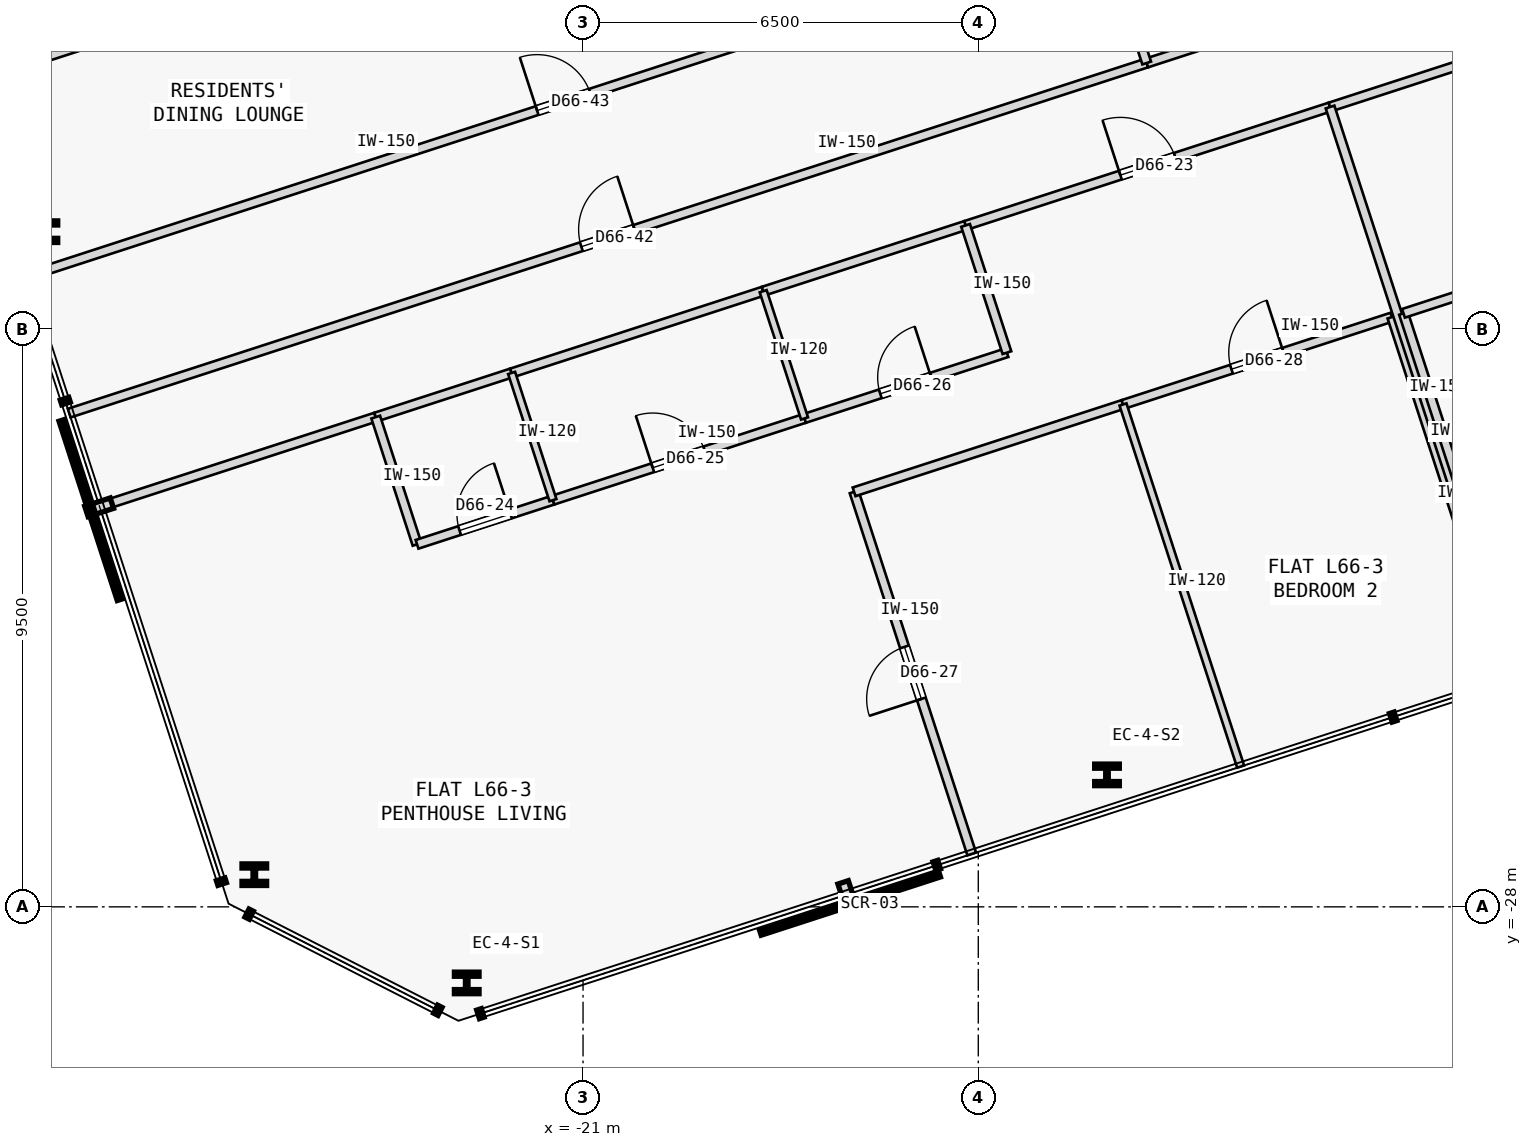
"""IFC4 building model, lengths in metres.
Left out: names, types, materials, properties, quantities, classifications, styles, units other than length and angle.
Written with IfcOpenShell. Run it as: python <this file> out.ifc"""

import sys

from ifc_helpers import new_model, si_unit, direction, frame, frame_2d, origin, origin_2d, place, context, subcontext, project, spatial, rectangle, i_section, extrude, element, fill, save


model = new_model("IFC4")
c1 = context("Model", 3, precision=1e-05, world=origin(), true_north=direction((0.0, 1.0)))
c2 = subcontext(c1, "Body", "Model", "MODEL_VIEW")
j1 = project(units=[si_unit("LENGTHUNIT", "METRE"), si_unit("PLANEANGLEUNIT", "RADIAN")], contexts=[c1])
p1 = place(None, origin())
s1 = spatial("IfcSite", under=j1, at=p1, CompositionType="ELEMENT")
p2 = place(p1, origin())
s2 = spatial("IfcBuilding", under=s1, at=p2, CompositionType="ELEMENT")
p3 = place(p2, frame((0.0, 0.0, 247.75)))
s3 = spatial("IfcBuildingStorey", under=s2, at=p3, CompositionType="ELEMENT", Elevation=247.75)
for number, where, z_axis, x_axis in (
    (1, (-22.913, -29.251, 0.0), (0.0, 0.0, 1.0), (1.0, 0.0, 0.0)),
    (2, (-12.384, -25.83, 0.0), (0.0, 0.0, 1.0), (1.0, 0.0, 0.0)),
    (3, (-29.842, -16.897, 0.0), (0.0, 0.0, 1.0), (1.0, 0.0, 0.0)),
    (4, (-26.406, -27.471, 0.0), (0.0, 0.0, 1.0), (1.0, 0.0, 0.0)),
):
    element("IfcColumn", number, at=place(p3, frame(where, z_axis=z_axis, x_axis=x_axis)), inside=s3, PredefinedType="COLUMN", context=c2, shape_type="SweptSolid", body=[
        extrude(i_section(OverallWidth=0.405, OverallDepth=0.355, WebThickness=0.042, FlangeThickness=0.068, FilletRadius=0.015, at=origin_2d()), origin(), (0.0, 0.0, 1.0), 3.35),
    ])
p4 = place(p3, frame((-28.95, -21.421, 0.0), z_axis=(0.0, 0.0, 1.0), x_axis=(0.951049476022, 0.309038661268, 0.0)))
e5 = element("IfcWall", 5, at=p4, inside=s3, PredefinedType="PARTITIONING", context=c2, shape_type="SweptSolid", body=[
    extrude(rectangle(XDim=4.774, YDim=0.15, at=frame_2d((2.387, 0.0))), origin(), (0.0, 0.0, 1.0), 3.125),
])
p5 = place(p3, frame((-14.709, -16.794, 0.0), z_axis=(0.0, 0.0, 1.0), x_axis=(0.951050295235, 0.309036140172, 0.0)))
e6 = element("IfcWall", 6, at=p5, inside=s3, PredefinedType="PARTITIONING", context=c2, shape_type="SweptSolid", body=[
    extrude(rectangle(XDim=6.302, YDim=0.15, at=frame_2d((3.151, 0.0))), origin(), (0.0, 0.0, 1.0), 3.125),
])
p6 = place(p5, frame((2.676, 0.0, 0.0)))
e7 = element("IfcOpeningElement", 7, at=p6, cuts=e6, PredefinedType="OPENING", context=c2, shape_type="SweptSolid", body=[
    extrude(rectangle(XDim=0.95, YDim=2.15, at=frame_2d((0.475, 1.075))), frame((0.0, 0.085, 0.0), z_axis=(0.0, -1.0, 0.0), x_axis=(1.0, 0.0, 0.0)), (0.0, 0.0, 1.0), 0.17),
])
p7 = place(p3, frame((-24.41, -19.946, 0.0), z_axis=(0.0, 0.0, 1.0), x_axis=(0.951076048914, 0.308956872689, 0.0)))
e8 = element("IfcWall", 8, at=p7, inside=s3, PredefinedType="PARTITIONING", context=c2, shape_type="SweptSolid", body=[
    extrude(rectangle(XDim=2.35, YDim=0.15, at=frame_2d((1.175, 0.0))), origin(), (0.0, 0.0, 1.0), 3.125),
])
p8 = place(p3, frame((-22.175, -19.22, 0.0), z_axis=(0.0, 0.0, 1.0), x_axis=(0.951052627573, 0.309028962374, 0.0)))
e9 = element("IfcWall", 9, at=p8, inside=s3, PredefinedType="PARTITIONING", context=c2, shape_type="SweptSolid", body=[
    extrude(rectangle(XDim=4.35, YDim=0.15, at=frame_2d((2.175, 0.0))), origin(), (0.0, 0.0, 1.0), 3.125),
])
p9 = place(p3, frame((-18.038, -17.876, 0.0), z_axis=(0.0, 0.0, 1.0), x_axis=(0.951062257173, 0.308999325213, 0.0)))
e10 = element("IfcWall", 10, at=p9, inside=s3, PredefinedType="PARTITIONING", context=c2, shape_type="SweptSolid", body=[
    extrude(rectangle(XDim=3.5, YDim=0.15, at=frame_2d((1.75, 0.0))), origin(), (0.0, 0.0, 1.0), 3.125),
])
p10 = place(p3, frame((-8.715, -14.847, 0.0), z_axis=(0.0, 0.0, 1.0), x_axis=(0.951061767293, 0.309000832997, 0.0)))
e11 = element("IfcWall", 11, at=p10, inside=s3, PredefinedType="PARTITIONING", context=c2, shape_type="SweptSolid", body=[
    extrude(rectangle(XDim=4.404, YDim=0.15, at=frame_2d((2.202, 0.0))), origin(), (0.0, 0.0, 1.0), 3.125),
])
p11 = place(p3, frame((-29.45, -19.881, 0.0), z_axis=(0.0, 0.0, 1.0), x_axis=(0.95105650271, 0.309017036186, 0.0)))
e12 = element("IfcWall", 12, at=p11, inside=s3, PredefinedType="PARTITIONING", context=c2, shape_type="SweptSolid", body=[
    extrude(rectangle(XDim=18.632, YDim=0.15, at=frame_2d((9.316, 0.0))), origin(), (0.0, 0.0, 1.0), 3.125),
])
p12 = place(p11, frame((8.856, 0.0, 0.0)))
e13 = element("IfcOpeningElement", 13, at=p12, cuts=e12, PredefinedType="OPENING", context=c2, shape_type="SweptSolid", body=[
    extrude(rectangle(XDim=0.92, YDim=2.15, at=frame_2d((0.46, 1.075))), frame((0.0, 0.085, 0.0), z_axis=(0.0, -1.0, 0.0), x_axis=(1.0, 0.0, 0.0)), (0.0, 0.0, 1.0), 0.17),
])
p13 = place(p3, frame((-11.73, -14.123, 0.0), z_axis=(0.0, 0.0, 1.0), x_axis=(0.951052502763, 0.309029346483, 0.0)))
e14 = element("IfcWall", 14, at=p13, inside=s3, PredefinedType="PARTITIONING", context=c2, shape_type="SweptSolid", body=[
    extrude(rectangle(XDim=3.698, YDim=0.15, at=frame_2d((1.849, 0.0))), origin(), (0.0, 0.0, 1.0), 3.125),
])
p14 = place(p13, frame((1.389, 0.0, 0.0)))
e15 = element("IfcOpeningElement", 15, at=p14, cuts=e14, PredefinedType="OPENING", context=c2, shape_type="SweptSolid", body=[
    extrude(rectangle(XDim=0.92, YDim=2.15, at=frame_2d((0.46, 1.075))), frame((0.0, 0.085, 0.0), z_axis=(0.0, -1.0, 0.0), x_axis=(1.0, 0.0, 0.0)), (0.0, 0.0, 1.0), 0.17),
])
p15 = place(p3, frame((-23.73, -22.038, 0.0), z_axis=(0.0, 0.0, 1.0), x_axis=(-0.309060979314, 0.951042223598, 0.0)))
e16 = element("IfcWall", 16, at=p15, inside=s3, PredefinedType="PARTITIONING", context=c2, shape_type="SweptSolid", body=[
    extrude(rectangle(XDim=2.2, YDim=0.15, at=frame_2d((1.1, 0.0))), origin(), (0.0, 0.0, 1.0), 3.125),
])
p16 = place(p3, frame((-23.73, -22.038, 0.0), z_axis=(0.0, 0.0, 1.0), x_axis=(0.951066131077, 0.308987401554, 0.0)))
e17 = element("IfcWall", 17, at=p16, inside=s3, PredefinedType="PARTITIONING", context=c2, shape_type="SweptSolid", body=[
    extrude(rectangle(XDim=2.35, YDim=0.15, at=frame_2d((1.175, 0.0))), origin(), (0.0, 0.0, 1.0), 3.125),
])
p17 = place(p16, frame((0.735, 0.0, 0.0)))
e18 = element("IfcOpeningElement", 18, at=p17, cuts=e17, PredefinedType="OPENING", context=c2, shape_type="SweptSolid", body=[
    extrude(rectangle(XDim=0.88, YDim=2.15, at=frame_2d((0.44, 1.075))), frame((0.0, 0.085, 0.0), z_axis=(0.0, -1.0, 0.0), x_axis=(1.0, 0.0, 0.0)), (0.0, 0.0, 1.0), 0.17),
])
p18 = place(p3, frame((-21.495, -21.312, 0.0), z_axis=(0.0, 0.0, 1.0), x_axis=(0.951057987102, 0.309012467661, 0.0)))
e19 = element("IfcWall", 19, at=p18, inside=s3, PredefinedType="PARTITIONING", context=c2, shape_type="SweptSolid", body=[
    extrude(rectangle(XDim=4.35, YDim=0.15, at=frame_2d((2.175, 0.0))), origin(), (0.0, 0.0, 1.0), 3.125),
])
p19 = place(p18, frame((1.725, 0.0, 0.0)))
e20 = element("IfcOpeningElement", 20, at=p19, cuts=e19, PredefinedType="OPENING", context=c2, shape_type="SweptSolid", body=[
    extrude(rectangle(XDim=0.9, YDim=2.15, at=frame_2d((0.45, 1.075))), frame((0.0, 0.085, 0.0), z_axis=(0.0, -1.0, 0.0), x_axis=(1.0, 0.0, 0.0)), (0.0, 0.0, 1.0), 0.17),
])
p20 = place(p3, frame((-17.358, -19.968, 0.0), z_axis=(0.0, 0.0, 1.0), x_axis=(0.951055596592, 0.309019824916, 0.0)))
e21 = element("IfcWall", 21, at=p20, inside=s3, PredefinedType="PARTITIONING", context=c2, shape_type="SweptSolid", body=[
    extrude(rectangle(XDim=3.5, YDim=0.15, at=frame_2d((1.75, 0.0))), origin(), (0.0, 0.0, 1.0), 3.125),
])
p21 = place(p20, frame((1.31, 0.0, 0.0)))
e22 = element("IfcOpeningElement", 22, at=p21, cuts=e21, PredefinedType="OPENING", context=c2, shape_type="SweptSolid", body=[
    extrude(rectangle(XDim=0.88, YDim=2.15, at=frame_2d((0.44, 1.075))), frame((0.0, 0.085, 0.0), z_axis=(0.0, -1.0, 0.0), x_axis=(1.0, 0.0, 0.0)), (0.0, 0.0, 1.0), 0.17),
])
p22 = place(p3, frame((-14.029, -18.886, 0.0), z_axis=(0.0, 0.0, 1.0), x_axis=(-0.308960600764, 0.951074837842, 0.0)))
e23 = element("IfcWall", 23, at=p22, inside=s3, PredefinedType="PARTITIONING", context=c2, shape_type="SweptSolid", body=[
    extrude(rectangle(XDim=2.2, YDim=0.15, at=frame_2d((1.1, 0.0))), origin(), (0.0, 0.0, 1.0), 3.125),
])
p23 = place(p3, frame((-14.608, -27.131, 0.0), z_axis=(0.0, 0.0, 1.0), x_axis=(-0.309013782848, 0.951057559777, 0.0)))
e24 = element("IfcWall", 24, at=p23, inside=s3, PredefinedType="PARTITIONING", context=c2, shape_type="SweptSolid", body=[
    extrude(rectangle(XDim=6.262, YDim=0.15, at=frame_2d((3.131, 0.0))), origin(), (0.0, 0.0, 1.0), 3.125),
])
p24 = place(p23, frame((2.681, 0.0, 0.0)))
e25 = element("IfcOpeningElement", 25, at=p24, cuts=e24, PredefinedType="OPENING", context=c2, shape_type="SweptSolid", body=[
    extrude(rectangle(XDim=0.9, YDim=2.15, at=frame_2d((0.45, 1.075))), frame((0.0, 0.085, 0.0), z_axis=(0.0, -1.0, 0.0), x_axis=(1.0, 0.0, 0.0)), (0.0, 0.0, 1.0), 0.17),
])
p25 = place(p3, frame((-16.543, -21.175, 0.0), z_axis=(0.0, 0.0, 1.0), x_axis=(0.951050272606, 0.309036209813, 0.0)))
e26 = element("IfcWall", 26, at=p25, inside=s3, PredefinedType="PARTITIONING", context=c2, shape_type="SweptSolid", body=[
    extrude(rectangle(XDim=4.65, YDim=0.15, at=frame_2d((2.325, 0.0))), origin(), (0.0, 0.0, 1.0), 3.125),
])
p26 = place(p3, frame((-12.12, -19.738, 0.0), z_axis=(0.0, 0.0, 1.0), x_axis=(0.951065702951, 0.308988719326, 0.0)))
e27 = element("IfcWall", 27, at=p26, inside=s3, PredefinedType="PARTITIONING", context=c2, shape_type="SweptSolid", body=[
    extrude(rectangle(XDim=4.65, YDim=0.15, at=frame_2d((2.325, 0.0))), origin(), (0.0, 0.0, 1.0), 3.125),
])
p27 = place(p26, frame((1.875, 0.0, 0.0)))
e28 = element("IfcOpeningElement", 28, at=p27, cuts=e27, PredefinedType="OPENING", context=c2, shape_type="SweptSolid", body=[
    extrude(rectangle(XDim=0.9, YDim=2.15, at=frame_2d((0.45, 1.075))), frame((0.0, 0.085, 0.0), z_axis=(0.0, -1.0, 0.0), x_axis=(1.0, 0.0, 0.0)), (0.0, 0.0, 1.0), 0.17),
])
p28 = place(p3, frame((-5.763, -24.257, 0.0), z_axis=(0.0, 0.0, 1.0), x_axis=(-0.309060506107, 0.951042377376, 0.0)))
e29 = element("IfcWall", 29, at=p28, inside=s3, PredefinedType="PARTITIONING", context=c2, shape_type="SweptSolid", body=[
    extrude(rectangle(XDim=6.262, YDim=0.15, at=frame_2d((3.131, 0.0))), origin(), (0.0, 0.0, 1.0), 3.125),
])
p29 = place(p3, frame((-5.668, -24.226, 0.0), z_axis=(0.0, 0.0, 1.0), x_axis=(-0.309022258842, 0.95105480575, 0.0)))
e30 = element("IfcWall", 30, at=p29, inside=s3, PredefinedType="PARTITIONING", context=c2, shape_type="SweptSolid", body=[
    extrude(rectangle(XDim=9.862, YDim=0.15, at=frame_2d((4.931, 0.0))), origin(), (0.0, 0.0, 1.0), 3.125),
])
for number, where, z_axis, x_axis in (
    (31, (-21.495, -21.312, 0.0), (0.0, 0.0, 1.0), (-0.309, 0.951, 0.0)),
    (32, (-17.358, -19.968, 0.0), (0.0, 0.0, 1.0), (-0.309, 0.951, 0.0)),
):
    element("IfcWall", number, at=place(p3, frame(where, z_axis=z_axis, x_axis=x_axis)), inside=s3, PredefinedType="PARTITIONING", context=c2, shape_type="SweptSolid", body=[
        extrude(rectangle(XDim=2.2, YDim=0.12, at=frame_2d((1.1, 0.0))), origin(), (0.0, 0.0, 1.0), 3.125),
    ])
p30 = place(p3, frame((-10.185, -25.694, 0.0), z_axis=(0.0, 0.0, 1.0), x_axis=(-0.309013782848, 0.951057559777, 0.0)))
e33 = element("IfcWall", 33, at=p30, inside=s3, PredefinedType="PARTITIONING", context=c2, shape_type="SweptSolid", body=[
    extrude(rectangle(XDim=6.262, YDim=0.12, at=frame_2d((3.131, 0.0))), origin(), (0.0, 0.0, 1.0), 3.125),
])
p31 = place(p3, frame((-5.573, -24.195, 0.0), z_axis=(0.0, 0.0, 1.0), x_axis=(-0.309049046683, 0.951046101272, 0.0)))
e34 = element("IfcWall", 34, at=p31, inside=s3, PredefinedType="PARTITIONING", context=c2, shape_type="SweptSolid", body=[
    extrude(rectangle(XDim=6.262, YDim=0.15, at=frame_2d((3.131, 0.0))), origin(), (0.0, 0.0, 1.0), 3.125),
])
p32 = place(p3, frame((-7.508, -18.24, 0.0), z_axis=(0.0, 0.0, 1.0), x_axis=(0.951070715387, 0.308973290646, 0.0)))
e35 = element("IfcWall", 35, at=p32, inside=s3, PredefinedType="PARTITIONING", context=c2, shape_type="SweptSolid", body=[
    extrude(rectangle(XDim=4.65, YDim=0.15, at=frame_2d((2.325, 0.0))), origin(), (0.0, 0.0, 1.0), 3.125),
])
p33 = place(p32, frame((1.875, 0.0, 0.0)))
e36 = element("IfcOpeningElement", 36, at=p33, cuts=e35, PredefinedType="OPENING", context=c2, shape_type="SweptSolid", body=[
    extrude(rectangle(XDim=0.9, YDim=2.15, at=frame_2d((0.45, 1.075))), frame((0.0, 0.085, 0.0), z_axis=(0.0, -1.0, 0.0), x_axis=(1.0, 0.0, 0.0)), (0.0, 0.0, 1.0), 0.17),
])
p34 = place(p3, frame((-30.178, -17.642, 0.0), z_axis=(0.0, 0.0, 1.0), x_axis=(0.95105650271, 0.309017036186, 0.0)))
e37 = element("IfcWall", 37, at=p34, inside=s3, PredefinedType="PARTITIONING", context=c2, shape_type="SweptSolid", body=[
    extrude(rectangle(XDim=18.632, YDim=0.15, at=frame_2d((9.316, 0.0))), origin(), (0.0, 0.0, 1.0), 3.125),
])
p35 = place(p34, frame((8.856, 0.0, 0.0)))
e38 = element("IfcOpeningElement", 38, at=p35, cuts=e37, PredefinedType="OPENING", context=c2, shape_type="SweptSolid", body=[
    extrude(rectangle(XDim=0.92, YDim=2.15, at=frame_2d((0.46, 1.075))), frame((0.0, 0.085, 0.0), z_axis=(0.0, -1.0, 0.0), x_axis=(1.0, 0.0, 0.0)), (0.0, 0.0, 1.0), 0.17),
])
p36 = place(p3, frame((-11.73, -14.123, 0.0), z_axis=(0.0, 0.0, 1.0), x_axis=(-0.309062621189, 0.951041690035, 0.0)))
e39 = element("IfcWall", 39, at=p36, inside=s3, PredefinedType="PARTITIONING", context=c2, shape_type="SweptSolid", body=[
    extrude(rectangle(XDim=2.354, YDim=0.15, at=frame_2d((1.177, 0.0))), origin(), (0.0, 0.0, 1.0), 3.125),
])
p37 = place(p3, frame((-31.208, -14.471, 0.0), z_axis=(0.0, 0.0, 1.0), x_axis=(0.951057753948, 0.309013185244, 0.0)))
e40 = element("IfcWall", 40, at=p37, inside=s3, PredefinedType="PARTITIONING", context=c2, shape_type="SweptSolid", body=[
    extrude(rectangle(XDim=18.632, YDim=0.15, at=frame_2d((9.316, 0.0))), origin(), (0.0, 0.0, 1.0), 3.125),
])
p38 = place(p6, origin())
e41 = element("IfcDoor", 41, at=p38, inside=s3, OperationType="SINGLE_SWING_LEFT", PredefinedType="DOOR", context=c2, shape_type="SweptSolid", body=[
    extrude(rectangle(XDim=0.95, YDim=2.15, at=frame_2d((0.475, 1.075))), frame((0.0, 0.025, 0.0), z_axis=(0.0, -1.0, 0.0), x_axis=(1.0, 0.0, 0.0)), (0.0, 0.0, 1.0), 0.05),
])
fill(e7, e41)
p39 = place(p17, origin())
e42 = element("IfcDoor", 42, at=p39, inside=s3, OperationType="SINGLE_SWING_RIGHT", PredefinedType="DOOR", context=c2, shape_type="SweptSolid", body=[
    extrude(rectangle(XDim=0.88, YDim=2.15, at=frame_2d((0.44, 1.075))), frame((0.0, 0.025, 0.0), z_axis=(0.0, -1.0, 0.0), x_axis=(1.0, 0.0, 0.0)), (0.0, 0.0, 1.0), 0.05),
])
fill(e18, e42)
p40 = place(p19, origin())
e43 = element("IfcDoor", 43, at=p40, inside=s3, OperationType="SINGLE_SWING_LEFT", PredefinedType="DOOR", context=c2, shape_type="SweptSolid", body=[
    extrude(rectangle(XDim=0.9, YDim=2.15, at=frame_2d((0.45, 1.075))), frame((0.0, 0.025, 0.0), z_axis=(0.0, -1.0, 0.0), x_axis=(1.0, 0.0, 0.0)), (0.0, 0.0, 1.0), 0.05),
])
fill(e20, e43)
p41 = place(p21, origin())
e44 = element("IfcDoor", 44, at=p41, inside=s3, OperationType="SINGLE_SWING_RIGHT", PredefinedType="DOOR", context=c2, shape_type="SweptSolid", body=[
    extrude(rectangle(XDim=0.88, YDim=2.15, at=frame_2d((0.44, 1.075))), frame((0.0, 0.025, 0.0), z_axis=(0.0, -1.0, 0.0), x_axis=(1.0, 0.0, 0.0)), (0.0, 0.0, 1.0), 0.05),
])
fill(e22, e44)
p42 = place(p24, origin())
e45 = element("IfcDoor", 45, at=p42, inside=s3, OperationType="SINGLE_SWING_LEFT", PredefinedType="DOOR", context=c2, shape_type="SweptSolid", body=[
    extrude(rectangle(XDim=0.9, YDim=2.15, at=frame_2d((0.45, 1.075))), frame((0.0, 0.025, 0.0), z_axis=(0.0, -1.0, 0.0), x_axis=(1.0, 0.0, 0.0)), (0.0, 0.0, 1.0), 0.05),
])
fill(e25, e45)
p43 = place(p27, origin())
e46 = element("IfcDoor", 46, at=p43, inside=s3, OperationType="SINGLE_SWING_RIGHT", PredefinedType="DOOR", context=c2, shape_type="SweptSolid", body=[
    extrude(rectangle(XDim=0.9, YDim=2.15, at=frame_2d((0.45, 1.075))), frame((0.0, 0.025, 0.0), z_axis=(0.0, -1.0, 0.0), x_axis=(1.0, 0.0, 0.0)), (0.0, 0.0, 1.0), 0.05),
])
fill(e28, e46)
p44 = place(p12, origin())
e47 = element("IfcDoor", 47, at=p44, inside=s3, OperationType="SINGLE_SWING_RIGHT", PredefinedType="DOOR", context=c2, shape_type="SweptSolid", body=[
    extrude(rectangle(XDim=0.92, YDim=2.15, at=frame_2d((0.46, 1.075))), frame((0.0, 0.025, 0.0), z_axis=(0.0, -1.0, 0.0), x_axis=(1.0, 0.0, 0.0)), (0.0, 0.0, 1.0), 0.05),
])
fill(e13, e47)
p45 = place(p35, origin())
e48 = element("IfcDoor", 48, at=p45, inside=s3, OperationType="SINGLE_SWING_LEFT", PredefinedType="DOOR", context=c2, shape_type="SweptSolid", body=[
    extrude(rectangle(XDim=0.92, YDim=2.15, at=frame_2d((0.46, 1.075))), frame((0.0, 0.025, 0.0), z_axis=(0.0, -1.0, 0.0), x_axis=(1.0, 0.0, 0.0)), (0.0, 0.0, 1.0), 0.05),
])
fill(e38, e48)
save(model, sys.argv[1])
